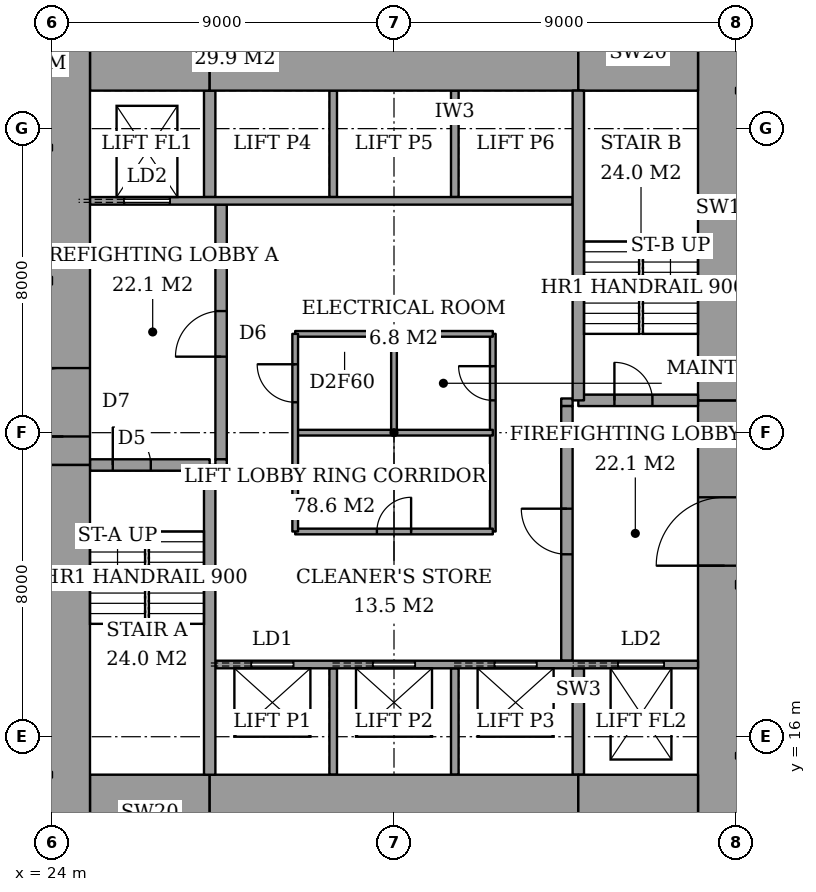
"""IFC4 building model, lengths in metres.
Left out: names, types, materials, properties, quantities, classifications, styles, units other than length and angle.
Written with IfcOpenShell. Run it as: python <this file> out.ifc"""

import sys

from ifc_helpers import new_model, si_unit, direction, frame, frame_2d, origin, place, context, subcontext, project, spatial, rectangle, extrude, element, fill, save


model = new_model("IFC4")
c1 = context("Model", 3, precision=1e-05, world=origin(), true_north=direction((0.0, 1.0)))
c2 = subcontext(c1, "Body", "Model", "MODEL_VIEW")
j1 = project(units=[si_unit("LENGTHUNIT", "METRE"), si_unit("PLANEANGLEUNIT", "RADIAN")], contexts=[c1])
p1 = place(None, origin())
s1 = spatial("IfcSite", under=j1, at=p1, CompositionType="ELEMENT")
p2 = place(p1, origin())
s2 = spatial("IfcBuilding", under=s1, at=p2, CompositionType="ELEMENT")
p3 = place(p2, frame((0.0, 0.0, 107.0)))
s3 = spatial("IfcBuildingStorey", under=s2, at=p3, CompositionType="ELEMENT", Elevation=107.0)
p4 = place(p3, frame((25.0, 14.0, 0.0), z_axis=(0.0, 0.0, 1.0), x_axis=(1.0, 0.0, 0.0)))
e1 = element("IfcWall", 1, at=p4, inside=s3, PredefinedType="SHEAR", context=c2, shape_type="SweptSolid", body=[
    extrude(rectangle(XDim=3.15, YDim=2.0, at=frame_2d((1.575, 0.0))), origin(), (0.0, 0.0, 1.0), 3.6),
])
p5 = place(p3, frame((28.15, 14.0, 0.0), z_axis=(0.0, 0.0, 1.0), x_axis=(1.0, 0.0, 0.0)))
e2 = element("IfcWall", 2, at=p5, inside=s3, PredefinedType="SHEAR", context=c2, shape_type="SweptSolid", body=[
    extrude(rectangle(XDim=9.7, YDim=2.0, at=frame_2d((4.85, 0.0))), origin(), (0.0, 0.0, 1.0), 3.6),
])
for number, where, z_axis, x_axis in (
    (3, (37.85, 14.0, 0.0), (0.0, 0.0, 1.0), (1.0, 0.0, 0.0)),
    (4, (25.0, 34.0, 0.0), (0.0, 0.0, 1.0), (1.0, 0.0, 0.0)),
):
    element("IfcWall", number, at=place(p3, frame(where, z_axis=z_axis, x_axis=x_axis)), inside=s3, PredefinedType="SHEAR", context=c2, shape_type="SweptSolid", body=[
        extrude(rectangle(XDim=3.15, YDim=2.0, at=frame_2d((1.575, 0.0))), origin(), (0.0, 0.0, 1.0), 3.6),
    ])
p6 = place(p3, frame((28.15, 34.0, 0.0), z_axis=(0.0, 0.0, 1.0), x_axis=(1.0, 0.0, 0.0)))
e5 = element("IfcWall", 5, at=p6, inside=s3, PredefinedType="SHEAR", context=c2, shape_type="SweptSolid", body=[
    extrude(rectangle(XDim=9.7, YDim=2.0, at=frame_2d((4.85, 0.0))), origin(), (0.0, 0.0, 1.0), 3.6),
])
p7 = place(p3, frame((37.85, 34.0, 0.0), z_axis=(0.0, 0.0, 1.0), x_axis=(1.0, 0.0, 0.0)))
e6 = element("IfcWall", 6, at=p7, inside=s3, PredefinedType="SHEAR", context=c2, shape_type="SweptSolid", body=[
    extrude(rectangle(XDim=3.15, YDim=2.0, at=frame_2d((1.575, 0.0))), origin(), (0.0, 0.0, 1.0), 3.6),
])
p8 = place(p3, frame((24.3, 13.0, 0.0), z_axis=(0.0, 0.0, 1.0), x_axis=(0.0, 1.0, 0.0)))
e7 = element("IfcWall", 7, at=p8, inside=s3, PredefinedType="SHEAR", context=c2, shape_type="SweptSolid", body=[
    extrude(rectangle(XDim=10.15, YDim=1.4, at=frame_2d((5.075, 0.0))), origin(), (0.0, 0.0, 1.0), 3.6),
])
p9 = place(p3, frame((24.3, 23.15, 0.0), z_axis=(0.0, 0.0, 1.0), x_axis=(0.0, 1.0, 0.0)))
e8 = element("IfcWall", 8, at=p9, inside=s3, PredefinedType="SHEAR", context=c2, shape_type="SweptSolid", body=[
    extrude(rectangle(XDim=11.85, YDim=1.4, at=frame_2d((5.925, 0.0))), origin(), (0.0, 0.0, 1.0), 3.6),
])
p10 = place(p9, frame((0.75, 0.0, 0.0)))
e9 = element("IfcOpeningElement", 9, at=p10, cuts=e8, PredefinedType="OPENING", context=c2, shape_type="SweptSolid", body=[
    extrude(rectangle(XDim=1.8, YDim=2.4, at=frame_2d((0.9, 1.2))), frame((0.0, 0.71, 0.0), z_axis=(0.0, -1.0, 0.0), x_axis=(1.0, 0.0, 0.0)), (0.0, 0.0, 1.0), 1.42),
])
p11 = place(p3, frame((41.7, 13.0, 0.0), z_axis=(0.0, 0.0, 1.0), x_axis=(0.0, 1.0, 0.0)))
e10 = element("IfcWall", 10, at=p11, inside=s3, PredefinedType="SHEAR", context=c2, shape_type="SweptSolid", body=[
    extrude(rectangle(XDim=11.85, YDim=1.4, at=frame_2d((5.925, 0.0))), origin(), (0.0, 0.0, 1.0), 3.6),
])
p12 = place(p11, frame((7.5, 0.0, 0.0)))
e11 = element("IfcOpeningElement", 11, at=p12, cuts=e10, PredefinedType="OPENING", context=c2, shape_type="SweptSolid", body=[
    extrude(rectangle(XDim=1.8, YDim=2.4, at=frame_2d((0.9, 1.2))), frame((0.0, 0.71, 0.0), z_axis=(0.0, -1.0, 0.0), x_axis=(1.0, 0.0, 0.0)), (0.0, 0.0, 1.0), 1.42),
])
p13 = place(p3, frame((41.7, 24.85, 0.0), z_axis=(0.0, 0.0, 1.0), x_axis=(0.0, 1.0, 0.0)))
e12 = element("IfcWall", 12, at=p13, inside=s3, PredefinedType="SHEAR", context=c2, shape_type="SweptSolid", body=[
    extrude(rectangle(XDim=10.15, YDim=1.4, at=frame_2d((5.075, 0.0))), origin(), (0.0, 0.0, 1.0), 3.6),
])
p14 = place(p3, frame((28.15, 15.0, 0.0), z_axis=(0.0, 0.0, 1.0), x_axis=(0.0, 1.0, 0.0)))
e13 = element("IfcWall", 13, at=p14, inside=s3, PredefinedType="SHEAR", context=c2, shape_type="SweptSolid", body=[
    extrude(rectangle(XDim=8.15, YDim=0.3, at=frame_2d((4.075, 0.0))), origin(), (0.0, 0.0, 1.0), 3.6),
])
p15 = place(p3, frame((25.0, 23.15, 0.0), z_axis=(0.0, 0.0, 1.0), x_axis=(1.0, 0.0, 0.0)))
e14 = element("IfcWall", 14, at=p15, inside=s3, PredefinedType="SHEAR", context=c2, shape_type="SweptSolid", body=[
    extrude(rectangle(XDim=3.15, YDim=0.3, at=frame_2d((1.575, 0.0))), origin(), (0.0, 0.0, 1.0), 3.6),
])
p16 = place(p15, frame((0.6, 0.0, 0.0)))
e15 = element("IfcOpeningElement", 15, at=p16, cuts=e14, PredefinedType="OPENING", context=c2, shape_type="SweptSolid", body=[
    extrude(rectangle(XDim=1.0, YDim=2.1, at=frame_2d((0.5, 1.05))), frame((0.0, 0.16, 0.0), z_axis=(0.0, -1.0, 0.0), x_axis=(1.0, 0.0, 0.0)), (0.0, 0.0, 1.0), 0.32),
])
p17 = place(p3, frame((37.85, 24.85, 0.0), z_axis=(0.0, 0.0, 1.0), x_axis=(0.0, 1.0, 0.0)))
e16 = element("IfcWall", 16, at=p17, inside=s3, PredefinedType="SHEAR", context=c2, shape_type="SweptSolid", body=[
    extrude(rectangle(XDim=8.15, YDim=0.3, at=frame_2d((4.075, 0.0))), origin(), (0.0, 0.0, 1.0), 3.6),
])
p18 = place(p3, frame((37.85, 24.85, 0.0), z_axis=(0.0, 0.0, 1.0), x_axis=(1.0, 0.0, 0.0)))
e17 = element("IfcWall", 17, at=p18, inside=s3, PredefinedType="SHEAR", context=c2, shape_type="SweptSolid", body=[
    extrude(rectangle(XDim=3.15, YDim=0.3, at=frame_2d((1.575, 0.0))), origin(), (0.0, 0.0, 1.0), 3.6),
])
p19 = place(p18, frame((0.95, 0.0, 0.0)))
e18 = element("IfcOpeningElement", 18, at=p19, cuts=e17, PredefinedType="OPENING", context=c2, shape_type="SweptSolid", body=[
    extrude(rectangle(XDim=1.0, YDim=2.1, at=frame_2d((0.5, 1.05))), frame((0.0, 0.16, 0.0), z_axis=(0.0, -1.0, 0.0), x_axis=(1.0, 0.0, 0.0)), (0.0, 0.0, 1.0), 0.32),
])
p20 = place(p3, frame((28.45, 23.3, 0.0), z_axis=(0.0, 0.0, 1.0), x_axis=(0.0, 1.0, 0.0)))
e19 = element("IfcWall", 19, at=p20, inside=s3, PredefinedType="PARTITIONING", context=c2, shape_type="SweptSolid", body=[
    extrude(rectangle(XDim=6.7, YDim=0.3, at=frame_2d((3.35, 0.0))), origin(), (0.0, 0.0, 1.0), 3.6),
])
p21 = place(p20, frame((2.7, 0.0, 0.0)))
e20 = element("IfcOpeningElement", 20, at=p21, cuts=e19, PredefinedType="OPENING", context=c2, shape_type="SweptSolid", body=[
    extrude(rectangle(XDim=1.2, YDim=2.1, at=frame_2d((0.6, 1.05))), frame((0.0, 0.16, 0.0), z_axis=(0.0, -1.0, 0.0), x_axis=(1.0, 0.0, 0.0)), (0.0, 0.0, 1.0), 0.32),
])
p22 = place(p3, frame((37.55, 18.0, 0.0), z_axis=(0.0, 0.0, 1.0), x_axis=(0.0, 1.0, 0.0)))
e21 = element("IfcWall", 21, at=p22, inside=s3, PredefinedType="PARTITIONING", context=c2, shape_type="SweptSolid", body=[
    extrude(rectangle(XDim=6.7, YDim=0.3, at=frame_2d((3.35, 0.0))), origin(), (0.0, 0.0, 1.0), 3.6),
])
p23 = place(p22, frame((2.8, 0.0, 0.0)))
e22 = element("IfcOpeningElement", 22, at=p23, cuts=e21, PredefinedType="OPENING", context=c2, shape_type="SweptSolid", body=[
    extrude(rectangle(XDim=1.2, YDim=2.1, at=frame_2d((0.6, 1.05))), frame((0.0, 0.16, 0.0), z_axis=(0.0, -1.0, 0.0), x_axis=(1.0, 0.0, 0.0)), (0.0, 0.0, 1.0), 0.32),
])
p24 = place(p3, frame((28.3, 17.9, 0.0), z_axis=(0.0, 0.0, 1.0), x_axis=(1.0, 0.0, 0.0)))
e23 = element("IfcWall", 23, at=p24, inside=s3, PredefinedType="PARTITIONING", context=c2, shape_type="SweptSolid", body=[
    extrude(rectangle(XDim=12.7, YDim=0.2, at=frame_2d((6.35, 0.0))), origin(), (0.0, 0.0, 1.0), 3.6),
])
p25 = place(p24, frame((0.95, 0.0, 0.0)))
e24 = element("IfcOpeningElement", 24, at=p25, cuts=e23, PredefinedType="OPENING", context=c2, shape_type="SweptSolid", body=[
    extrude(rectangle(XDim=1.1, YDim=2.1, at=frame_2d((0.55, 1.05))), frame((0.0, 0.11, 0.0), z_axis=(0.0, -1.0, 0.0), x_axis=(1.0, 0.0, 0.0)), (0.0, 0.0, 1.0), 0.22),
])
p26 = place(p24, frame((4.15, 0.0, 0.0)))
e25 = element("IfcOpeningElement", 25, at=p26, cuts=e23, PredefinedType="OPENING", context=c2, shape_type="SweptSolid", body=[
    extrude(rectangle(XDim=1.1, YDim=2.1, at=frame_2d((0.55, 1.05))), frame((0.0, 0.11, 0.0), z_axis=(0.0, -1.0, 0.0), x_axis=(1.0, 0.0, 0.0)), (0.0, 0.0, 1.0), 0.22),
])
p27 = place(p24, frame((7.35, 0.0, 0.0)))
e26 = element("IfcOpeningElement", 26, at=p27, cuts=e23, PredefinedType="OPENING", context=c2, shape_type="SweptSolid", body=[
    extrude(rectangle(XDim=1.1, YDim=2.1, at=frame_2d((0.55, 1.05))), frame((0.0, 0.11, 0.0), z_axis=(0.0, -1.0, 0.0), x_axis=(1.0, 0.0, 0.0)), (0.0, 0.0, 1.0), 0.22),
])
p28 = place(p24, frame((10.6, 0.0, 0.0)))
e27 = element("IfcOpeningElement", 27, at=p28, cuts=e23, PredefinedType="OPENING", context=c2, shape_type="SweptSolid", body=[
    extrude(rectangle(XDim=1.2, YDim=2.1, at=frame_2d((0.6, 1.05))), frame((0.0, 0.11, 0.0), z_axis=(0.0, -1.0, 0.0), x_axis=(1.0, 0.0, 0.0)), (0.0, 0.0, 1.0), 0.22),
])
p29 = place(p3, frame((25.0, 30.1, 0.0), z_axis=(0.0, 0.0, 1.0), x_axis=(1.0, 0.0, 0.0)))
e28 = element("IfcWall", 28, at=p29, inside=s3, PredefinedType="PARTITIONING", context=c2, shape_type="SweptSolid", body=[
    extrude(rectangle(XDim=12.7, YDim=0.2, at=frame_2d((6.35, 0.0))), origin(), (0.0, 0.0, 1.0), 3.6),
])
p30 = place(p29, frame((0.9, 0.0, 0.0)))
e29 = element("IfcOpeningElement", 29, at=p30, cuts=e28, PredefinedType="OPENING", context=c2, shape_type="SweptSolid", body=[
    extrude(rectangle(XDim=1.2, YDim=2.1, at=frame_2d((0.6, 1.05))), frame((0.0, 0.11, 0.0), z_axis=(0.0, -1.0, 0.0), x_axis=(1.0, 0.0, 0.0)), (0.0, 0.0, 1.0), 0.22),
])
for number, where, z_axis, x_axis in (
    (30, (31.4, 15.0, 0.0), (0.0, 0.0, 1.0), (0.0, 1.0, 0.0)),
    (31, (34.6, 15.0, 0.0), (0.0, 0.0, 1.0), (0.0, 1.0, 0.0)),
):
    element("IfcWall", number, at=place(p3, frame(where, z_axis=z_axis, x_axis=x_axis)), inside=s3, PredefinedType="PARTITIONING", context=c2, shape_type="SweptSolid", body=[
        extrude(rectangle(XDim=2.8, YDim=0.2, at=frame_2d((1.4, 0.0))), origin(), (0.0, 0.0, 1.0), 3.6),
    ])
p31 = place(p3, frame((37.85, 15.0, 0.0), z_axis=(0.0, 0.0, 1.0), x_axis=(0.0, 1.0, 0.0)))
e32 = element("IfcWall", 32, at=p31, inside=s3, PredefinedType="SHEAR", context=c2, shape_type="SweptSolid", body=[
    extrude(rectangle(XDim=2.8, YDim=0.3, at=frame_2d((1.4, 0.0))), origin(), (0.0, 0.0, 1.0), 3.6),
])
for number, where, z_axis, x_axis in (
    (33, (31.4, 30.2, 0.0), (0.0, 0.0, 1.0), (0.0, 1.0, 0.0)),
    (34, (34.6, 30.2, 0.0), (0.0, 0.0, 1.0), (0.0, 1.0, 0.0)),
):
    element("IfcWall", number, at=place(p3, frame(where, z_axis=z_axis, x_axis=x_axis)), inside=s3, PredefinedType="PARTITIONING", context=c2, shape_type="SweptSolid", body=[
        extrude(rectangle(XDim=2.8, YDim=0.2, at=frame_2d((1.4, 0.0))), origin(), (0.0, 0.0, 1.0), 3.6),
    ])
p32 = place(p3, frame((28.15, 30.2, 0.0), z_axis=(0.0, 0.0, 1.0), x_axis=(0.0, 1.0, 0.0)))
e35 = element("IfcWall", 35, at=p32, inside=s3, PredefinedType="SHEAR", context=c2, shape_type="SweptSolid", body=[
    extrude(rectangle(XDim=2.8, YDim=0.3, at=frame_2d((1.4, 0.0))), origin(), (0.0, 0.0, 1.0), 3.6),
])
for number, where, z_axis, x_axis in (
    (36, (28.3, 23.2, 0.0), (0.0, 0.0, 1.0), (1.0, 0.0, 0.0)),
    (37, (37.4, 24.8, 0.0), (0.0, 0.0, 1.0), (1.0, 0.0, 0.0)),
):
    element("IfcWall", number, at=place(p3, frame(where, z_axis=z_axis, x_axis=x_axis)), inside=s3, PredefinedType="PARTITIONING", context=c2, shape_type="SweptSolid", body=[
        extrude(rectangle(XDim=0.3, YDim=0.2, at=frame_2d((0.15, 0.0))), origin(), (0.0, 0.0, 1.0), 3.6),
    ])
p33 = place(p3, frame((30.4, 21.4, 0.0), z_axis=(0.0, 0.0, 1.0), x_axis=(1.0, 0.0, 0.0)))
e38 = element("IfcWall", 38, at=p33, inside=s3, PredefinedType="PARTITIONING", context=c2, shape_type="SweptSolid", body=[
    extrude(rectangle(XDim=5.2, YDim=0.15, at=frame_2d((2.6, 0.0))), origin(), (0.0, 0.0, 1.0), 3.35),
])
p34 = place(p33, frame((2.15, 0.0, 0.0)))
e39 = element("IfcOpeningElement", 39, at=p34, cuts=e38, PredefinedType="OPENING", context=c2, shape_type="SweptSolid", body=[
    extrude(rectangle(XDim=0.9, YDim=2.1, at=frame_2d((0.45, 1.05))), frame((0.0, 0.085, 0.0), z_axis=(0.0, -1.0, 0.0), x_axis=(1.0, 0.0, 0.0)), (0.0, 0.0, 1.0), 0.17),
])
p35 = place(p3, frame((30.4, 26.6, 0.0), z_axis=(0.0, 0.0, 1.0), x_axis=(1.0, 0.0, 0.0)))
e40 = element("IfcWall", 40, at=p35, inside=s3, PredefinedType="PARTITIONING", context=c2, shape_type="SweptSolid", body=[
    extrude(rectangle(XDim=5.2, YDim=0.15, at=frame_2d((2.6, 0.0))), origin(), (0.0, 0.0, 1.0), 3.35),
])
p36 = place(p3, frame((30.4, 21.4, 0.0), z_axis=(0.0, 0.0, 1.0), x_axis=(0.0, 1.0, 0.0)))
e41 = element("IfcWall", 41, at=p36, inside=s3, PredefinedType="PARTITIONING", context=c2, shape_type="SweptSolid", body=[
    extrude(rectangle(XDim=5.2, YDim=0.15, at=frame_2d((2.6, 0.0))), origin(), (0.0, 0.0, 1.0), 3.35),
])
p37 = place(p36, frame((3.4, 0.0, 0.0)))
e42 = element("IfcOpeningElement", 42, at=p37, cuts=e41, PredefinedType="OPENING", context=c2, shape_type="SweptSolid", body=[
    extrude(rectangle(XDim=1.0, YDim=2.1, at=frame_2d((0.5, 1.05))), frame((0.0, 0.085, 0.0), z_axis=(0.0, -1.0, 0.0), x_axis=(1.0, 0.0, 0.0)), (0.0, 0.0, 1.0), 0.17),
])
p38 = place(p3, frame((35.6, 21.4, 0.0), z_axis=(0.0, 0.0, 1.0), x_axis=(0.0, 1.0, 0.0)))
e43 = element("IfcWall", 43, at=p38, inside=s3, PredefinedType="PARTITIONING", context=c2, shape_type="SweptSolid", body=[
    extrude(rectangle(XDim=5.2, YDim=0.15, at=frame_2d((2.6, 0.0))), origin(), (0.0, 0.0, 1.0), 3.35),
])
p39 = place(p38, frame((3.45, 0.0, 0.0)))
e44 = element("IfcOpeningElement", 44, at=p39, cuts=e43, PredefinedType="OPENING", context=c2, shape_type="SweptSolid", body=[
    extrude(rectangle(XDim=0.9, YDim=2.1, at=frame_2d((0.45, 1.05))), frame((0.0, 0.085, 0.0), z_axis=(0.0, -1.0, 0.0), x_axis=(1.0, 0.0, 0.0)), (0.0, 0.0, 1.0), 0.17),
])
p40 = place(p3, frame((30.4, 24.0, 0.0), z_axis=(0.0, 0.0, 1.0), x_axis=(1.0, 0.0, 0.0)))
e45 = element("IfcWall", 45, at=p40, inside=s3, PredefinedType="PARTITIONING", context=c2, shape_type="SweptSolid", body=[
    extrude(rectangle(XDim=5.2, YDim=0.15, at=frame_2d((2.6, 0.0))), origin(), (0.0, 0.0, 1.0), 3.35),
])
p41 = place(p3, frame((33.0, 24.0, 0.0), z_axis=(0.0, 0.0, 1.0), x_axis=(0.0, 1.0, 0.0)))
e46 = element("IfcWall", 46, at=p41, inside=s3, PredefinedType="PARTITIONING", context=c2, shape_type="SweptSolid", body=[
    extrude(rectangle(XDim=2.6, YDim=0.15, at=frame_2d((1.3, 0.0))), origin(), (0.0, 0.0, 1.0), 3.35),
])
p42 = place(p16, origin())
e47 = element("IfcDoor", 47, at=p42, inside=s3, OperationType="SINGLE_SWING_RIGHT", PredefinedType="DOOR", context=c2, shape_type="SweptSolid", body=[
    extrude(rectangle(XDim=1.0, YDim=2.1, at=frame_2d((0.5, 1.05))), frame((0.0, 0.025, 0.0), z_axis=(0.0, -1.0, 0.0), x_axis=(1.0, 0.0, 0.0)), (0.0, 0.0, 1.0), 0.05),
])
fill(e15, e47)
p43 = place(p19, origin())
e48 = element("IfcDoor", 48, at=p43, inside=s3, OperationType="SINGLE_SWING_RIGHT", PredefinedType="DOOR", context=c2, shape_type="SweptSolid", body=[
    extrude(rectangle(XDim=1.0, YDim=2.1, at=frame_2d((0.5, 1.05))), frame((0.0, 0.025, 0.0), z_axis=(0.0, -1.0, 0.0), x_axis=(1.0, 0.0, 0.0)), (0.0, 0.0, 1.0), 0.05),
])
fill(e18, e48)
p44 = place(p21, origin())
e49 = element("IfcDoor", 49, at=p44, inside=s3, OperationType="SINGLE_SWING_RIGHT", PredefinedType="DOOR", context=c2, shape_type="SweptSolid", body=[
    extrude(rectangle(XDim=1.2, YDim=2.1, at=frame_2d((0.6, 1.05))), frame((0.0, 0.025, 0.0), z_axis=(0.0, -1.0, 0.0), x_axis=(1.0, 0.0, 0.0)), (0.0, 0.0, 1.0), 0.05),
])
fill(e20, e49)
p45 = place(p23, origin())
e50 = element("IfcDoor", 50, at=p45, inside=s3, OperationType="SINGLE_SWING_LEFT", PredefinedType="DOOR", context=c2, shape_type="SweptSolid", body=[
    extrude(rectangle(XDim=1.2, YDim=2.1, at=frame_2d((0.6, 1.05))), frame((0.0, 0.025, 0.0), z_axis=(0.0, -1.0, 0.0), x_axis=(1.0, 0.0, 0.0)), (0.0, 0.0, 1.0), 0.05),
])
fill(e22, e50)
p46 = place(p10, origin())
e51 = element("IfcDoor", 51, at=p46, inside=s3, OperationType="DOUBLE_DOOR_DOUBLE_SWING", PredefinedType="DOOR", context=c2, shape_type="SweptSolid", body=[
    extrude(rectangle(XDim=1.8, YDim=2.4, at=frame_2d((0.9, 1.2))), frame((0.0, 0.025, 0.0), z_axis=(0.0, -1.0, 0.0), x_axis=(1.0, 0.0, 0.0)), (0.0, 0.0, 1.0), 0.05),
])
fill(e9, e51)
p47 = place(p12, origin())
e52 = element("IfcDoor", 52, at=p47, inside=s3, OperationType="DOUBLE_DOOR_DOUBLE_SWING", PredefinedType="DOOR", context=c2, shape_type="SweptSolid", body=[
    extrude(rectangle(XDim=1.8, YDim=2.4, at=frame_2d((0.9, 1.2))), frame((0.0, 0.025, 0.0), z_axis=(0.0, -1.0, 0.0), x_axis=(1.0, 0.0, 0.0)), (0.0, 0.0, 1.0), 0.05),
])
fill(e11, e52)
p48 = place(p34, origin())
e53 = element("IfcDoor", 53, at=p48, inside=s3, OperationType="SINGLE_SWING_LEFT", PredefinedType="DOOR", context=c2, shape_type="SweptSolid", body=[
    extrude(rectangle(XDim=0.9, YDim=2.1, at=frame_2d((0.45, 1.05))), frame((0.0, 0.025, 0.0), z_axis=(0.0, -1.0, 0.0), x_axis=(1.0, 0.0, 0.0)), (0.0, 0.0, 1.0), 0.05),
])
fill(e39, e53)
p49 = place(p37, origin())
e54 = element("IfcDoor", 54, at=p49, inside=s3, OperationType="SINGLE_SWING_LEFT", PredefinedType="DOOR", context=c2, shape_type="SweptSolid", body=[
    extrude(rectangle(XDim=1.0, YDim=2.1, at=frame_2d((0.5, 1.05))), frame((0.0, 0.025, 0.0), z_axis=(0.0, -1.0, 0.0), x_axis=(1.0, 0.0, 0.0)), (0.0, 0.0, 1.0), 0.05),
])
fill(e42, e54)
p50 = place(p39, origin())
e55 = element("IfcDoor", 55, at=p50, inside=s3, OperationType="SINGLE_SWING_LEFT", PredefinedType="DOOR", context=c2, shape_type="SweptSolid", body=[
    extrude(rectangle(XDim=0.9, YDim=2.1, at=frame_2d((0.45, 1.05))), frame((0.0, 0.025, 0.0), z_axis=(0.0, -1.0, 0.0), x_axis=(1.0, 0.0, 0.0)), (0.0, 0.0, 1.0), 0.05),
])
fill(e44, e55)
p51 = place(p25, origin())
e56 = element("IfcDoor", 56, at=p51, inside=s3, OperationType="SLIDING_TO_LEFT", PredefinedType="DOOR", context=c2, shape_type="SweptSolid", body=[
    extrude(rectangle(XDim=1.1, YDim=2.1, at=frame_2d((0.55, 1.05))), frame((0.0, 0.025, 0.0), z_axis=(0.0, -1.0, 0.0), x_axis=(1.0, 0.0, 0.0)), (0.0, 0.0, 1.0), 0.05),
])
fill(e24, e56)
p52 = place(p26, origin())
e57 = element("IfcDoor", 57, at=p52, inside=s3, OperationType="SLIDING_TO_LEFT", PredefinedType="DOOR", context=c2, shape_type="SweptSolid", body=[
    extrude(rectangle(XDim=1.1, YDim=2.1, at=frame_2d((0.55, 1.05))), frame((0.0, 0.025, 0.0), z_axis=(0.0, -1.0, 0.0), x_axis=(1.0, 0.0, 0.0)), (0.0, 0.0, 1.0), 0.05),
])
fill(e25, e57)
p53 = place(p27, origin())
e58 = element("IfcDoor", 58, at=p53, inside=s3, OperationType="SLIDING_TO_LEFT", PredefinedType="DOOR", context=c2, shape_type="SweptSolid", body=[
    extrude(rectangle(XDim=1.1, YDim=2.1, at=frame_2d((0.55, 1.05))), frame((0.0, 0.025, 0.0), z_axis=(0.0, -1.0, 0.0), x_axis=(1.0, 0.0, 0.0)), (0.0, 0.0, 1.0), 0.05),
])
fill(e26, e58)
p54 = place(p30, origin())
e59 = element("IfcDoor", 59, at=p54, inside=s3, OperationType="SLIDING_TO_LEFT", PredefinedType="DOOR", context=c2, shape_type="SweptSolid", body=[
    extrude(rectangle(XDim=1.2, YDim=2.1, at=frame_2d((0.6, 1.05))), frame((0.0, 0.025, 0.0), z_axis=(0.0, -1.0, 0.0), x_axis=(1.0, 0.0, 0.0)), (0.0, 0.0, 1.0), 0.05),
])
fill(e29, e59)
p55 = place(p28, origin())
e60 = element("IfcDoor", 60, at=p55, inside=s3, OperationType="SLIDING_TO_LEFT", PredefinedType="DOOR", context=c2, shape_type="SweptSolid", body=[
    extrude(rectangle(XDim=1.2, YDim=2.1, at=frame_2d((0.6, 1.05))), frame((0.0, 0.025, 0.0), z_axis=(0.0, -1.0, 0.0), x_axis=(1.0, 0.0, 0.0)), (0.0, 0.0, 1.0), 0.05),
])
fill(e27, e60)
save(model, sys.argv[1])
